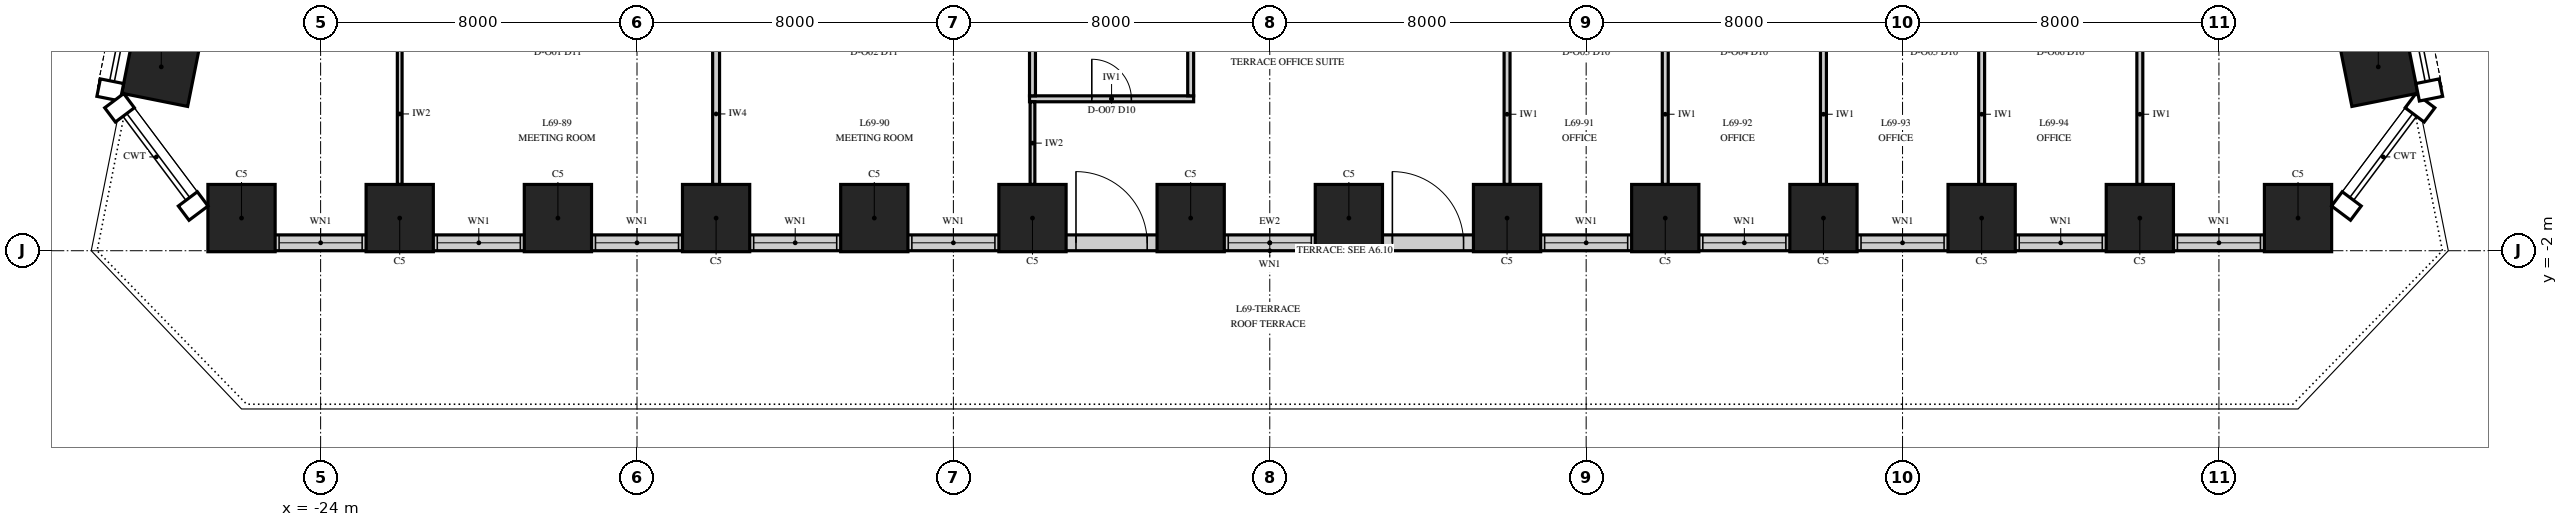
"""IFC4 building model, lengths in metres.
Left out: names, types, materials, properties, quantities, classifications, styles, units other than length and angle.
Written with IfcOpenShell. Run it as: python <this file> out.ifc"""

import sys

from ifc_helpers import new_model, si_unit, direction, frame, frame_2d, origin, origin_2d, place, context, subcontext, project, spatial, rectangle, extrude, element, fill, save


model = new_model("IFC4")
c1 = context("Model", 3, precision=1e-05, world=origin(), true_north=direction((0.0, 1.0)))
c2 = subcontext(c1, "Body", "Model", "MODEL_VIEW")
j1 = project(units=[si_unit("LENGTHUNIT", "METRE"), si_unit("PLANEANGLEUNIT", "RADIAN")], contexts=[c1])
p1 = place(None, origin())
s1 = spatial("IfcSite", under=j1, at=p1, CompositionType="ELEMENT")
p2 = place(p1, origin())
s2 = spatial("IfcBuilding", under=s1, at=p2, CompositionType="ELEMENT")
p3 = place(p2, frame((0.0, 0.0, 296.0)))
s3 = spatial("IfcBuildingStorey", under=s2, at=p3, CompositionType="ELEMENT", Elevation=296.0)
for number, where, z_axis, x_axis in (
    (1, (-26.0, -1.175, -0.25), (0.0, 0.0, 1.0), (1.0, 0.0, 0.0)),
    (2, (-22.0, -1.175, -0.25), (0.0, 0.0, 1.0), (1.0, 0.0, 0.0)),
    (3, (-18.0, -1.175, -0.25), (0.0, 0.0, 1.0), (1.0, 0.0, 0.0)),
    (4, (-14.0, -1.175, -0.25), (0.0, 0.0, 1.0), (1.0, 0.0, 0.0)),
    (5, (-10.0, -1.175, -0.25), (0.0, 0.0, 1.0), (1.0, 0.0, 0.0)),
    (6, (-6.0, -1.175, -0.25), (0.0, 0.0, 1.0), (1.0, 0.0, 0.0)),
    (7, (-2.0, -1.175, -0.25), (0.0, 0.0, 1.0), (1.0, 0.0, 0.0)),
    (8, (2.0, -1.175, -0.25), (0.0, 0.0, 1.0), (1.0, 0.0, 0.0)),
    (9, (6.0, -1.175, -0.25), (0.0, 0.0, 1.0), (1.0, 0.0, 0.0)),
    (10, (10.0, -1.175, -0.25), (0.0, 0.0, 1.0), (1.0, 0.0, 0.0)),
    (11, (14.0, -1.175, -0.25), (0.0, 0.0, 1.0), (1.0, 0.0, 0.0)),
    (12, (18.0, -1.175, -0.25), (0.0, 0.0, 1.0), (1.0, 0.0, 0.0)),
    (13, (22.0, -1.175, -0.25), (0.0, 0.0, 1.0), (1.0, 0.0, 0.0)),
    (14, (26.0, -1.175, -0.25), (0.0, 0.0, 1.0), (1.0, 0.0, 0.0)),
):
    element("IfcColumn", number, at=place(p3, frame(where, z_axis=z_axis, x_axis=x_axis)), inside=s3, PredefinedType="COLUMN", context=c2, shape_type="SweptSolid", body=[
        extrude(rectangle(XDim=1.7, YDim=1.7, at=origin_2d()), origin(), (0.0, 0.0, 1.0), 4.25),
    ])
for number, where, z_axis, x_axis in (
    (15, (28.029, 2.647, 0.0), (0.0, 0.0, 1.0), (-0.196, 0.981, 0.0)),
    (16, (-28.029, 2.647, 0.0), (0.0, 0.0, 1.0), (-0.196, -0.981, 0.0)),
):
    element("IfcColumn", number, at=place(p3, frame(where, z_axis=z_axis, x_axis=x_axis)), inside=s3, PredefinedType="COLUMN", context=c2, shape_type="SweptSolid", body=[
        extrude(rectangle(XDim=1.7, YDim=1.7, at=origin_2d()), origin(), (0.0, 0.0, 1.0), 4.0),
    ])
p4 = place(p3, frame((-26.0, -1.8, 0.0), z_axis=(0.0, 0.0, 1.0), x_axis=(1.0, 0.0, 0.0)))
e17 = element("IfcWall", 17, at=p4, inside=s3, PredefinedType="SOLIDWALL", context=c2, shape_type="SweptSolid", body=[
    extrude(rectangle(XDim=52.0, YDim=0.4, at=frame_2d((26.0, 0.0))), origin(), (0.0, 0.0, 1.0), 2.0),
])
p5 = place(p4, frame((0.95, 0.0, 0.8)))
e18 = element("IfcOpeningElement", 18, at=p5, cuts=e17, PredefinedType="OPENING", context=c2, shape_type="SweptSolid", body=[
    extrude(rectangle(XDim=2.1, YDim=1.15, at=frame_2d((1.05, 0.575))), frame((0.0, 0.215, 0.0), z_axis=(0.0, -1.0, 0.0), x_axis=(1.0, 0.0, 0.0)), (0.0, 0.0, 1.0), 0.43),
])
p6 = place(p4, frame((4.95, 0.0, 0.8)))
e19 = element("IfcOpeningElement", 19, at=p6, cuts=e17, PredefinedType="OPENING", context=c2, shape_type="SweptSolid", body=[
    extrude(rectangle(XDim=2.1, YDim=1.15, at=frame_2d((1.05, 0.575))), frame((0.0, 0.215, 0.0), z_axis=(0.0, -1.0, 0.0), x_axis=(1.0, 0.0, 0.0)), (0.0, 0.0, 1.0), 0.43),
])
p7 = place(p4, frame((8.95, 0.0, 0.8)))
e20 = element("IfcOpeningElement", 20, at=p7, cuts=e17, PredefinedType="OPENING", context=c2, shape_type="SweptSolid", body=[
    extrude(rectangle(XDim=2.1, YDim=1.15, at=frame_2d((1.05, 0.575))), frame((0.0, 0.215, 0.0), z_axis=(0.0, -1.0, 0.0), x_axis=(1.0, 0.0, 0.0)), (0.0, 0.0, 1.0), 0.43),
])
p8 = place(p4, frame((12.95, 0.0, 0.8)))
e21 = element("IfcOpeningElement", 21, at=p8, cuts=e17, PredefinedType="OPENING", context=c2, shape_type="SweptSolid", body=[
    extrude(rectangle(XDim=2.1, YDim=1.15, at=frame_2d((1.05, 0.575))), frame((0.0, 0.215, 0.0), z_axis=(0.0, -1.0, 0.0), x_axis=(1.0, 0.0, 0.0)), (0.0, 0.0, 1.0), 0.43),
])
p9 = place(p4, frame((16.95, 0.0, 0.8)))
e22 = element("IfcOpeningElement", 22, at=p9, cuts=e17, PredefinedType="OPENING", context=c2, shape_type="SweptSolid", body=[
    extrude(rectangle(XDim=2.1, YDim=1.15, at=frame_2d((1.05, 0.575))), frame((0.0, 0.215, 0.0), z_axis=(0.0, -1.0, 0.0), x_axis=(1.0, 0.0, 0.0)), (0.0, 0.0, 1.0), 0.43),
])
p10 = place(p4, frame((21.1, 0.0, 0.0)))
e23 = element("IfcOpeningElement", 23, at=p10, cuts=e17, PredefinedType="OPENING", context=c2, shape_type="SweptSolid", body=[
    extrude(rectangle(XDim=1.8, YDim=2.0, at=frame_2d((0.9, 1.0))), frame((0.0, 0.215, 0.0), z_axis=(0.0, -1.0, 0.0), x_axis=(1.0, 0.0, 0.0)), (0.0, 0.0, 1.0), 0.43),
])
p11 = place(p4, frame((24.95, 0.0, 0.8)))
e24 = element("IfcOpeningElement", 24, at=p11, cuts=e17, PredefinedType="OPENING", context=c2, shape_type="SweptSolid", body=[
    extrude(rectangle(XDim=2.1, YDim=1.15, at=frame_2d((1.05, 0.575))), frame((0.0, 0.215, 0.0), z_axis=(0.0, -1.0, 0.0), x_axis=(1.0, 0.0, 0.0)), (0.0, 0.0, 1.0), 0.43),
])
p12 = place(p4, frame((29.1, 0.0, 0.0)))
e25 = element("IfcOpeningElement", 25, at=p12, cuts=e17, PredefinedType="OPENING", context=c2, shape_type="SweptSolid", body=[
    extrude(rectangle(XDim=1.8, YDim=2.0, at=frame_2d((0.9, 1.0))), frame((0.0, 0.215, 0.0), z_axis=(0.0, -1.0, 0.0), x_axis=(1.0, 0.0, 0.0)), (0.0, 0.0, 1.0), 0.43),
])
p13 = place(p4, frame((32.95, 0.0, 0.8)))
e26 = element("IfcOpeningElement", 26, at=p13, cuts=e17, PredefinedType="OPENING", context=c2, shape_type="SweptSolid", body=[
    extrude(rectangle(XDim=2.1, YDim=1.15, at=frame_2d((1.05, 0.575))), frame((0.0, 0.215, 0.0), z_axis=(0.0, -1.0, 0.0), x_axis=(1.0, 0.0, 0.0)), (0.0, 0.0, 1.0), 0.43),
])
p14 = place(p4, frame((36.95, 0.0, 0.8)))
e27 = element("IfcOpeningElement", 27, at=p14, cuts=e17, PredefinedType="OPENING", context=c2, shape_type="SweptSolid", body=[
    extrude(rectangle(XDim=2.1, YDim=1.15, at=frame_2d((1.05, 0.575))), frame((0.0, 0.215, 0.0), z_axis=(0.0, -1.0, 0.0), x_axis=(1.0, 0.0, 0.0)), (0.0, 0.0, 1.0), 0.43),
])
p15 = place(p4, frame((40.95, 0.0, 0.8)))
e28 = element("IfcOpeningElement", 28, at=p15, cuts=e17, PredefinedType="OPENING", context=c2, shape_type="SweptSolid", body=[
    extrude(rectangle(XDim=2.1, YDim=1.15, at=frame_2d((1.05, 0.575))), frame((0.0, 0.215, 0.0), z_axis=(0.0, -1.0, 0.0), x_axis=(1.0, 0.0, 0.0)), (0.0, 0.0, 1.0), 0.43),
])
p16 = place(p4, frame((44.95, 0.0, 0.8)))
e29 = element("IfcOpeningElement", 29, at=p16, cuts=e17, PredefinedType="OPENING", context=c2, shape_type="SweptSolid", body=[
    extrude(rectangle(XDim=2.1, YDim=1.15, at=frame_2d((1.05, 0.575))), frame((0.0, 0.215, 0.0), z_axis=(0.0, -1.0, 0.0), x_axis=(1.0, 0.0, 0.0)), (0.0, 0.0, 1.0), 0.43),
])
p17 = place(p4, frame((48.95, 0.0, 0.8)))
e30 = element("IfcOpeningElement", 30, at=p17, cuts=e17, PredefinedType="OPENING", context=c2, shape_type="SweptSolid", body=[
    extrude(rectangle(XDim=2.1, YDim=1.15, at=frame_2d((1.05, 0.575))), frame((0.0, 0.215, 0.0), z_axis=(0.0, -1.0, 0.0), x_axis=(1.0, 0.0, 0.0)), (0.0, 0.0, 1.0), 0.43),
])
p18 = place(p3, frame((-6.075, 1.84, 0.0), z_axis=(0.0, 0.0, 1.0), x_axis=(1.0, 0.0, 0.0)))
e31 = element("IfcWall", 31, at=p18, inside=s3, PredefinedType="PARTITIONING", context=c2, shape_type="SweptSolid", body=[
    extrude(rectangle(XDim=4.15, YDim=0.15, at=frame_2d((2.075, 0.0))), origin(), (0.0, 0.0, 1.0), 3.23),
])
p19 = place(p18, frame((1.575, 0.0, 0.0)))
e32 = element("IfcOpeningElement", 32, at=p19, cuts=e31, PredefinedType="OPENING", context=c2, shape_type="SweptSolid", body=[
    extrude(rectangle(XDim=1.0, YDim=2.3, at=frame_2d((0.5, 1.15))), frame((0.0, 0.09, 0.0), z_axis=(0.0, -1.0, 0.0), x_axis=(1.0, 0.0, 0.0)), (0.0, 0.0, 1.0), 0.18),
])
p20 = place(p3, frame((-22.0, -0.325, 0.0), z_axis=(0.0, 0.0, 1.0), x_axis=(0.0, 1.0, 0.0)))
e33 = element("IfcWall", 33, at=p20, inside=s3, PredefinedType="PARTITIONING", context=c2, shape_type="SweptSolid", body=[
    extrude(rectangle(XDim=3.565, YDim=0.12, at=frame_2d((1.782, 0.0))), origin(), (0.0, 0.0, 1.0), 3.23),
])
p21 = place(p3, frame((-14.0, -0.325, 0.0), z_axis=(0.0, 0.0, 1.0), x_axis=(0.0, 1.0, 0.0)))
e34 = element("IfcWall", 34, at=p21, inside=s3, PredefinedType="PARTITIONING", context=c2, shape_type="SweptSolid", body=[
    extrude(rectangle(XDim=3.565, YDim=0.175, at=frame_2d((1.782, 0.0))), origin(), (0.0, 0.0, 1.0), 3.23),
])
p22 = place(p3, frame((-6.0, -0.325, 0.0), z_axis=(0.0, 0.0, 1.0), x_axis=(0.0, 1.0, 0.0)))
e35 = element("IfcWall", 35, at=p22, inside=s3, PredefinedType="PARTITIONING", context=c2, shape_type="SweptSolid", body=[
    extrude(rectangle(XDim=2.09, YDim=0.12, at=frame_2d((1.045, 0.0))), origin(), (0.0, 0.0, 1.0), 3.23),
])
p23 = place(p3, frame((-6.0, 1.915, 0.0), z_axis=(0.0, 0.0, 1.0), x_axis=(0.0, 1.0, 0.0)))
e36 = element("IfcWall", 36, at=p23, inside=s3, PredefinedType="PARTITIONING", context=c2, shape_type="SweptSolid", body=[
    extrude(rectangle(XDim=3.925, YDim=0.15, at=frame_2d((1.962, 0.0))), origin(), (0.0, 0.0, 1.0), 3.23),
])
p24 = place(p3, frame((-2.0, 1.915, 0.0), z_axis=(0.0, 0.0, 1.0), x_axis=(0.0, 1.0, 0.0)))
e37 = element("IfcWall", 37, at=p24, inside=s3, PredefinedType="PARTITIONING", context=c2, shape_type="SweptSolid", body=[
    extrude(rectangle(XDim=3.925, YDim=0.15, at=frame_2d((1.962, 0.0))), origin(), (0.0, 0.0, 1.0), 3.85),
])
for number, where, z_axis, x_axis in (
    (38, (6.0, -0.325, 0.0), (0.0, 0.0, 1.0), (0.0, 1.0, 0.0)),
    (39, (10.0, -0.325, 0.0), (0.0, 0.0, 1.0), (0.0, 1.0, 0.0)),
    (40, (14.0, -0.325, 0.0), (0.0, 0.0, 1.0), (0.0, 1.0, 0.0)),
    (41, (18.0, -0.325, 0.0), (0.0, 0.0, 1.0), (0.0, 1.0, 0.0)),
    (42, (22.0, -0.325, 0.0), (0.0, 0.0, 1.0), (0.0, 1.0, 0.0)),
):
    element("IfcWall", number, at=place(p3, frame(where, z_axis=z_axis, x_axis=x_axis)), inside=s3, PredefinedType="PARTITIONING", context=c2, shape_type="SweptSolid", body=[
        extrude(rectangle(XDim=3.55, YDim=0.15, at=frame_2d((1.775, 0.0))), origin(), (0.0, 0.0, 1.0), 3.23),
    ])
p25 = place(p5, origin())
e43 = element("IfcWindow", 43, at=p25, inside=s3, PartitioningType="SINGLE_PANEL", PredefinedType="WINDOW", context=c2, shape_type="SweptSolid", body=[
    extrude(rectangle(XDim=2.1, YDim=1.15, at=frame_2d((1.05, 0.575))), frame((0.0, 0.03, 0.0), z_axis=(0.0, -1.0, 0.0), x_axis=(1.0, 0.0, 0.0)), (0.0, 0.0, 1.0), 0.06),
])
fill(e18, e43)
p26 = place(p6, origin())
e44 = element("IfcWindow", 44, at=p26, inside=s3, PartitioningType="SINGLE_PANEL", PredefinedType="WINDOW", context=c2, shape_type="SweptSolid", body=[
    extrude(rectangle(XDim=2.1, YDim=1.15, at=frame_2d((1.05, 0.575))), frame((0.0, 0.03, 0.0), z_axis=(0.0, -1.0, 0.0), x_axis=(1.0, 0.0, 0.0)), (0.0, 0.0, 1.0), 0.06),
])
fill(e19, e44)
p27 = place(p7, origin())
e45 = element("IfcWindow", 45, at=p27, inside=s3, PartitioningType="SINGLE_PANEL", PredefinedType="WINDOW", context=c2, shape_type="SweptSolid", body=[
    extrude(rectangle(XDim=2.1, YDim=1.15, at=frame_2d((1.05, 0.575))), frame((0.0, 0.03, 0.0), z_axis=(0.0, -1.0, 0.0), x_axis=(1.0, 0.0, 0.0)), (0.0, 0.0, 1.0), 0.06),
])
fill(e20, e45)
p28 = place(p8, origin())
e46 = element("IfcWindow", 46, at=p28, inside=s3, PartitioningType="SINGLE_PANEL", PredefinedType="WINDOW", context=c2, shape_type="SweptSolid", body=[
    extrude(rectangle(XDim=2.1, YDim=1.15, at=frame_2d((1.05, 0.575))), frame((0.0, 0.03, 0.0), z_axis=(0.0, -1.0, 0.0), x_axis=(1.0, 0.0, 0.0)), (0.0, 0.0, 1.0), 0.06),
])
fill(e21, e46)
p29 = place(p9, origin())
e47 = element("IfcWindow", 47, at=p29, inside=s3, PartitioningType="SINGLE_PANEL", PredefinedType="WINDOW", context=c2, shape_type="SweptSolid", body=[
    extrude(rectangle(XDim=2.1, YDim=1.15, at=frame_2d((1.05, 0.575))), frame((0.0, 0.03, 0.0), z_axis=(0.0, -1.0, 0.0), x_axis=(1.0, 0.0, 0.0)), (0.0, 0.0, 1.0), 0.06),
])
fill(e22, e47)
p30 = place(p10, origin())
e48 = element("IfcDoor", 48, at=p30, inside=s3, OperationType="DOUBLE_DOOR_SINGLE_SWING", PredefinedType="DOOR", context=c2, shape_type="SweptSolid", body=[
    extrude(rectangle(XDim=1.8, YDim=2.0, at=frame_2d((0.9, 1.0))), frame((0.0, 0.2, 0.0), z_axis=(0.0, -1.0, 0.0), x_axis=(1.0, 0.0, 0.0)), (0.0, 0.0, 1.0), 0.399),
])
fill(e23, e48)
p31 = place(p11, origin())
e49 = element("IfcWindow", 49, at=p31, inside=s3, PartitioningType="SINGLE_PANEL", PredefinedType="WINDOW", context=c2, shape_type="SweptSolid", body=[
    extrude(rectangle(XDim=2.1, YDim=1.15, at=frame_2d((1.05, 0.575))), frame((0.0, 0.03, 0.0), z_axis=(0.0, -1.0, 0.0), x_axis=(1.0, 0.0, 0.0)), (0.0, 0.0, 1.0), 0.06),
])
fill(e24, e49)
p32 = place(p12, origin())
e50 = element("IfcDoor", 50, at=p32, inside=s3, OperationType="DOUBLE_DOOR_SINGLE_SWING", PredefinedType="DOOR", context=c2, shape_type="SweptSolid", body=[
    extrude(rectangle(XDim=1.8, YDim=2.0, at=frame_2d((0.9, 1.0))), frame((0.0, 0.2, 0.0), z_axis=(0.0, -1.0, 0.0), x_axis=(1.0, 0.0, 0.0)), (0.0, 0.0, 1.0), 0.399),
])
fill(e25, e50)
p33 = place(p13, origin())
e51 = element("IfcWindow", 51, at=p33, inside=s3, PartitioningType="SINGLE_PANEL", PredefinedType="WINDOW", context=c2, shape_type="SweptSolid", body=[
    extrude(rectangle(XDim=2.1, YDim=1.15, at=frame_2d((1.05, 0.575))), frame((0.0, 0.03, 0.0), z_axis=(0.0, -1.0, 0.0), x_axis=(1.0, 0.0, 0.0)), (0.0, 0.0, 1.0), 0.06),
])
fill(e26, e51)
p34 = place(p14, origin())
e52 = element("IfcWindow", 52, at=p34, inside=s3, PartitioningType="SINGLE_PANEL", PredefinedType="WINDOW", context=c2, shape_type="SweptSolid", body=[
    extrude(rectangle(XDim=2.1, YDim=1.15, at=frame_2d((1.05, 0.575))), frame((0.0, 0.03, 0.0), z_axis=(0.0, -1.0, 0.0), x_axis=(1.0, 0.0, 0.0)), (0.0, 0.0, 1.0), 0.06),
])
fill(e27, e52)
p35 = place(p15, origin())
e53 = element("IfcWindow", 53, at=p35, inside=s3, PartitioningType="SINGLE_PANEL", PredefinedType="WINDOW", context=c2, shape_type="SweptSolid", body=[
    extrude(rectangle(XDim=2.1, YDim=1.15, at=frame_2d((1.05, 0.575))), frame((0.0, 0.03, 0.0), z_axis=(0.0, -1.0, 0.0), x_axis=(1.0, 0.0, 0.0)), (0.0, 0.0, 1.0), 0.06),
])
fill(e28, e53)
p36 = place(p16, origin())
e54 = element("IfcWindow", 54, at=p36, inside=s3, PartitioningType="SINGLE_PANEL", PredefinedType="WINDOW", context=c2, shape_type="SweptSolid", body=[
    extrude(rectangle(XDim=2.1, YDim=1.15, at=frame_2d((1.05, 0.575))), frame((0.0, 0.03, 0.0), z_axis=(0.0, -1.0, 0.0), x_axis=(1.0, 0.0, 0.0)), (0.0, 0.0, 1.0), 0.06),
])
fill(e29, e54)
p37 = place(p17, origin())
e55 = element("IfcWindow", 55, at=p37, inside=s3, PartitioningType="SINGLE_PANEL", PredefinedType="WINDOW", context=c2, shape_type="SweptSolid", body=[
    extrude(rectangle(XDim=2.1, YDim=1.15, at=frame_2d((1.05, 0.575))), frame((0.0, 0.03, 0.0), z_axis=(0.0, -1.0, 0.0), x_axis=(1.0, 0.0, 0.0)), (0.0, 0.0, 1.0), 0.06),
])
fill(e30, e55)
p38 = place(p19, origin())
e56 = element("IfcDoor", 56, at=p38, inside=s3, OperationType="SINGLE_SWING_LEFT", PredefinedType="DOOR", context=c2, shape_type="SweptSolid", body=[
    extrude(rectangle(XDim=1.0, YDim=2.3, at=frame_2d((0.5, 1.15))), frame((0.0, 0.075, 0.0), z_axis=(0.0, -1.0, 0.0), x_axis=(1.0, 0.0, 0.0)), (0.0, 0.0, 1.0), 0.149),
])
fill(e32, e56)
save(model, sys.argv[1])
